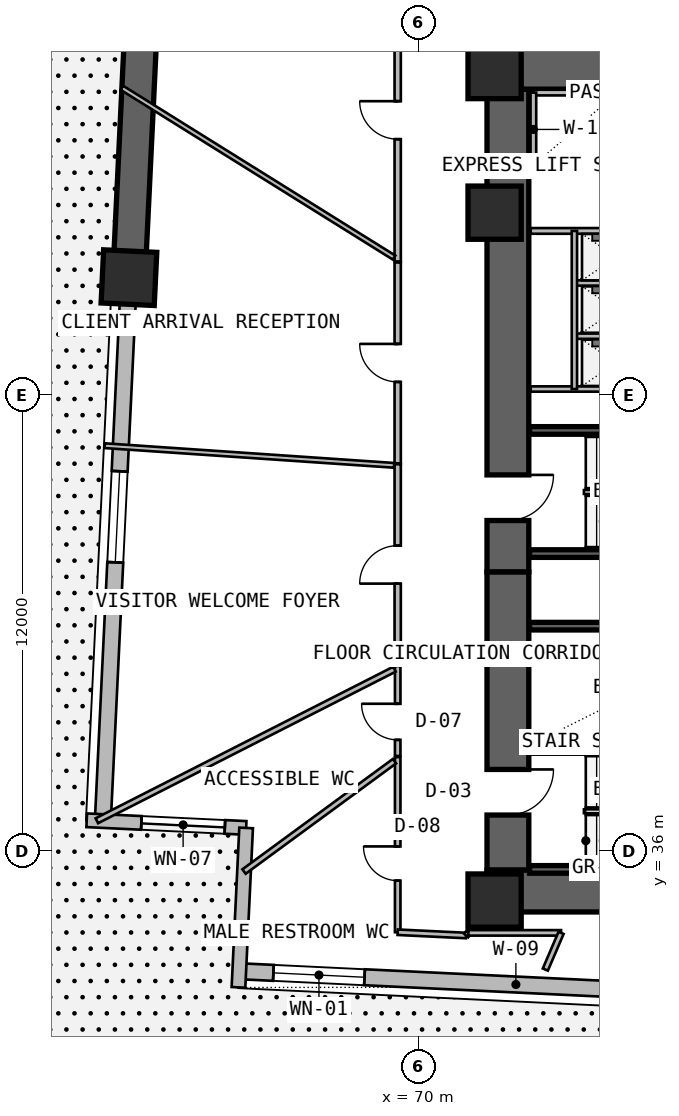
"""IFC4 building model, lengths in metres.
Left out: names, types, materials, properties, quantities, classifications, styles, units other than length and angle.
Written with IfcOpenShell. Run it as: python <this file> out.ifc"""

import sys

from ifc_helpers import new_model, si_unit, direction, frame, frame_2d, origin, origin_2d, place, context, subcontext, project, spatial, rectangle, extrude, element, fill, save


model = new_model("IFC4")
c1 = context("Model", 3, precision=1e-05, world=origin(), true_north=direction((0.0, 1.0)))
c2 = subcontext(c1, "Body", "Model", "MODEL_VIEW")
j1 = project(units=[si_unit("LENGTHUNIT", "METRE"), si_unit("PLANEANGLEUNIT", "RADIAN")], contexts=[c1])
p1 = place(None, origin())
s1 = spatial("IfcSite", under=j1, at=p1, CompositionType="ELEMENT")
p2 = place(p1, origin())
s2 = spatial("IfcBuilding", under=s1, at=p2, CompositionType="ELEMENT")
p3 = place(p2, frame((0.0, 0.0, 26.7)))
s3 = spatial("IfcBuildingStorey", under=s2, at=p3, CompositionType="ELEMENT", Elevation=26.7)
p4 = place(p3, frame((72.35, 35.5, -0.4), z_axis=(0.0, 0.0, 1.0), x_axis=(0.0, 1.0, 0.0)))
e1 = element("IfcWall", 1, at=p4, inside=s3, PredefinedType="SHEAR", context=c2, shape_type="SweptSolid", body=[
    extrude(rectangle(XDim=7.85, YDim=1.1, at=frame_2d((3.925, 0.0))), origin(), (0.0, 0.0, 1.0), 3.8),
])
p5 = place(p4, frame((1.45, 0.0, 0.4)))
e2 = element("IfcOpeningElement", 2, at=p5, cuts=e1, PredefinedType="OPENING", context=c2, shape_type="SweptSolid", body=[
    extrude(rectangle(XDim=1.2, YDim=2.2, at=frame_2d((0.6, 1.1))), frame((0.0, 0.56, 0.0), z_axis=(0.0, -1.0, 0.0), x_axis=(1.0, 0.0, 0.0)), (0.0, 0.0, 1.0), 1.12),
])
p6 = place(p3, frame((71.8, 34.95, -0.4), z_axis=(0.0, 0.0, 1.0), x_axis=(1.0, 0.0, 0.0)))
e3 = element("IfcWall", 3, at=p6, inside=s3, PredefinedType="SHEAR", context=c2, shape_type="SweptSolid", body=[
    extrude(rectangle(XDim=14.3, YDim=1.1, at=frame_2d((7.15, 0.0))), origin(), (0.0, 0.0, 1.0), 3.8),
])
p7 = place(p3, frame((72.35, 43.35, -0.4), z_axis=(0.0, 0.0, 1.0), x_axis=(0.0, 1.0, 0.0)))
e4 = element("IfcWall", 4, at=p7, inside=s3, PredefinedType="SHEAR", context=c2, shape_type="SweptSolid", body=[
    extrude(rectangle(XDim=12.7, YDim=1.1, at=frame_2d((6.35, 0.0))), origin(), (0.0, 0.0, 1.0), 3.8),
])
p8 = place(p7, frame((1.35, 0.0, 0.4)))
e5 = element("IfcOpeningElement", 5, at=p8, cuts=e4, PredefinedType="OPENING", context=c2, shape_type="SweptSolid", body=[
    extrude(rectangle(XDim=1.2, YDim=2.2, at=frame_2d((0.6, 1.1))), frame((0.0, 0.56, 0.0), z_axis=(0.0, -1.0, 0.0), x_axis=(1.0, 0.0, 0.0)), (0.0, 0.0, 1.0), 1.12),
])
p9 = place(p3, frame((71.8, 56.6, -0.4), z_axis=(0.0, 0.0, 1.0), x_axis=(1.0, 0.0, 0.0)))
e6 = element("IfcWall", 6, at=p9, inside=s3, PredefinedType="SHEAR", context=c2, shape_type="SweptSolid", body=[
    extrude(rectangle(XDim=14.3, YDim=1.1, at=frame_2d((7.15, 0.0))), origin(), (0.0, 0.0, 1.0), 3.8),
])
for number, where, z_axis, x_axis in (
    (7, (72.0, 34.7, 0.0), (0.0, 0.0, 1.0), (1.0, 0.0, 0.0)),
    (8, (72.0, 52.8, 0.0), (0.0, 0.0, 1.0), (1.0, 0.0, 0.0)),
    (9, (72.0, 56.5, 0.0), (0.0, 0.0, 1.0), (1.0, 0.0, 0.0)),
):
    element("IfcColumn", number, at=place(p3, frame(where, z_axis=z_axis, x_axis=x_axis)), inside=s3, PredefinedType="COLUMN", context=c2, shape_type="SweptSolid", body=[
        extrude(rectangle(XDim=1.4, YDim=1.4, at=origin_2d()), origin(), (0.0, 0.0, 1.0), 3.6),
    ])
p10 = place(p3, frame((62.378, 51.09, -0.4), z_axis=(0.0, 0.0, 1.0), x_axis=(0.047978128521, 0.998848386485, 0.0)))
e10 = element("IfcColumn", 10, at=p10, inside=s3, PredefinedType="COLUMN", context=c2, shape_type="SweptSolid", body=[
    extrude(rectangle(XDim=1.4, YDim=1.4, at=origin_2d()), origin(), (0.0, 0.0, 1.0), 4.0),
])
p11 = place(p3, frame((65.281, 32.841, 0.0), z_axis=(0.0, 0.0, 1.0), x_axis=(0.998848298084, -0.047979968897, 0.0)))
e11 = element("IfcWall", 11, at=p11, inside=s3, PredefinedType="SOLIDWALL", context=c2, shape_type="SweptSolid", body=[
    extrude(rectangle(XDim=17.952, YDim=0.42, at=frame_2d((8.976, 0.0))), origin(), (0.0, 0.0, 1.0), 2.385),
])
p12 = place(p11, frame((11.276, 0.0, 0.0)))
e12 = element("IfcOpeningElement", 12, at=p12, cuts=e11, PredefinedType="OPENING", context=c2, shape_type="SweptSolid", body=[
    extrude(rectangle(XDim=1.8, YDim=2.35, at=frame_2d((0.9, 1.175))), frame((0.0, 0.22, 0.0), z_axis=(0.0, -1.0, 0.0), x_axis=(1.0, 0.0, 0.0)), (0.0, 0.0, 1.0), 0.44),
])
p13 = place(p11, frame((0.9, 0.0, 1.2)))
e13 = element("IfcOpeningElement", 13, at=p13, cuts=e11, PredefinedType="OPENING", context=c2, shape_type="SweptSolid", body=[
    extrude(rectangle(XDim=2.4, YDim=0.9, at=frame_2d((1.2, 0.45))), frame((0.0, 0.22, 0.0), z_axis=(0.0, -1.0, 0.0), x_axis=(1.0, 0.0, 0.0)), (0.0, 0.0, 1.0), 0.44),
])
p14 = place(p3, frame((63.428, 72.957, -0.4), z_axis=(0.0, 0.0, 1.0), x_axis=(-0.047976309476, -0.998848473858, 0.0)))
e14 = element("IfcWall", 14, at=p14, inside=s3, PredefinedType="SHEAR", context=c2, shape_type="SweptSolid", body=[
    extrude(rectangle(XDim=21.892, YDim=0.85, at=frame_2d((10.946, 0.0))), origin(), (0.0, 0.0, 1.0), 3.8),
])
p15 = place(p3, frame((62.378, 51.09, 0.0), z_axis=(0.0, 0.0, 1.0), x_axis=(-0.047978424452, -0.99884837227, 0.0)))
e15 = element("IfcWall", 15, at=p15, inside=s3, PredefinedType="SOLIDWALL", context=c2, shape_type="SweptSolid", body=[
    extrude(rectangle(XDim=14.314, YDim=0.42, at=frame_2d((7.157, 0.0))), origin(), (0.0, 0.0, 1.0), 2.385),
])
p16 = place(p15, frame((5.1, 0.0, 1.2)))
e16 = element("IfcOpeningElement", 16, at=p16, cuts=e15, PredefinedType="OPENING", context=c2, shape_type="SweptSolid", body=[
    extrude(rectangle(XDim=2.4, YDim=0.9, at=frame_2d((1.2, 0.45))), frame((0.0, 0.22, 0.0), z_axis=(0.0, -1.0, 0.0), x_axis=(1.0, 0.0, 0.0)), (0.0, 0.0, 1.0), 0.44),
])
p17 = place(p3, frame((61.267, 36.812, 0.0), z_axis=(0.0, 0.0, 1.0), x_axis=(0.998849519138, -0.047954542207, 0.0)))
e17 = element("IfcWall", 17, at=p17, inside=s3, PredefinedType="SOLIDWALL", context=c2, shape_type="SweptSolid", body=[
    extrude(rectangle(XDim=4.2, YDim=0.36, at=frame_2d((2.1, 0.0))), origin(), (0.0, 0.0, 1.0), 3.4),
])
p18 = place(p17, frame((1.44, 0.0, 0.45)))
e18 = element("IfcOpeningElement", 18, at=p18, cuts=e17, PredefinedType="OPENING", context=c2, shape_type="SweptSolid", body=[
    extrude(rectangle(XDim=2.2, YDim=2.4, at=frame_2d((1.1, 1.2))), frame((0.0, 0.19, 0.0), z_axis=(0.0, -1.0, 0.0), x_axis=(1.0, 0.0, 0.0)), (0.0, 0.0, 1.0), 0.38),
])
p19 = place(p3, frame((65.462, 36.611, 0.0), z_axis=(0.0, 0.0, 1.0), x_axis=(-0.048015322758, -0.998846599224, 0.0)))
e19 = element("IfcWall", 19, at=p19, inside=s3, PredefinedType="SOLIDWALL", context=c2, shape_type="SweptSolid", body=[
    extrude(rectangle(XDim=4.2, YDim=0.36, at=frame_2d((2.1, 0.0))), origin(), (0.0, 0.0, 1.0), 3.4),
])
for number, where, z_axis, x_axis in (
    (20, (72.92, 35.52, -0.4), (0.0, 0.0, 1.0), (1.0, 0.0, 0.0)),
    (21, (72.92, 38.675, -0.4), (0.0, 0.0, 1.0), (1.0, 0.0, 0.0)),
):
    element("IfcWall", number, at=place(p3, frame(where, z_axis=z_axis, x_axis=x_axis)), inside=s3, PredefinedType="SOLIDWALL", context=c2, shape_type="SweptSolid", body=[
        extrude(rectangle(XDim=7.7, YDim=0.2, at=frame_2d((3.85, 0.0))), origin(), (0.0, 0.0, 1.0), 3.8),
    ])
p20 = place(p3, frame((72.92, 41.92, -0.4), z_axis=(0.0, 0.0, 1.0), x_axis=(1.0, 0.0, 0.0)))
e22 = element("IfcWall", 22, at=p20, inside=s3, PredefinedType="SOLIDWALL", context=c2, shape_type="SweptSolid", body=[
    extrude(rectangle(XDim=7.58, YDim=0.2, at=frame_2d((3.79, 0.0))), origin(), (0.0, 0.0, 1.0), 3.8),
])
for number, where, z_axis, x_axis in (
    (23, (72.92, 43.83, -0.4), (0.0, 0.0, 1.0), (1.0, 0.0, 0.0)),
    (24, (72.92, 47.07, -0.4), (0.0, 0.0, 1.0), (1.0, 0.0, 0.0)),
):
    element("IfcWall", number, at=place(p3, frame(where, z_axis=z_axis, x_axis=x_axis)), inside=s3, PredefinedType="SOLIDWALL", context=c2, shape_type="SweptSolid", body=[
        extrude(rectangle(XDim=7.7, YDim=0.2, at=frame_2d((3.85, 0.0))), origin(), (0.0, 0.0, 1.0), 3.8),
    ])
p21 = place(p3, frame((72.95, 52.32, 0.0), z_axis=(0.0, 0.0, 1.0), x_axis=(1.0, 0.0, 0.0)))
e25 = element("IfcWall", 25, at=p21, inside=s3, PredefinedType="SOLIDWALL", context=c2, shape_type="SweptSolid", body=[
    extrude(rectangle(XDim=3.33, YDim=0.15, at=frame_2d((1.665, 0.0))), origin(), (0.0, 0.0, 1.0), 3.4),
])
p22 = place(p3, frame((72.95, 48.16, 0.0), z_axis=(0.0, 0.0, 1.0), x_axis=(1.0, 0.0, 0.0)))
e26 = element("IfcWall", 26, at=p22, inside=s3, PredefinedType="PLUMBINGWALL", context=c2, shape_type="SweptSolid", body=[
    extrude(rectangle(XDim=3.24, YDim=0.14, at=frame_2d((1.62, 0.0))), origin(), (0.0, 0.0, 1.0), 3.4),
])
for number, where, z_axis, x_axis in (
    (27, (74.15, 49.55, 0.0), (0.0, 0.0, 1.0), (1.0, 0.0, 0.0)),
    (28, (74.15, 50.95, 0.0), (0.0, 0.0, 1.0), (1.0, 0.0, 0.0)),
):
    element("IfcWall", number, at=place(p3, frame(where, z_axis=z_axis, x_axis=x_axis)), inside=s3, PredefinedType="PLUMBINGWALL", context=c2, shape_type="SweptSolid", body=[
        extrude(rectangle(XDim=2.04, YDim=0.14, at=frame_2d((1.02, 0.0))), origin(), (0.0, 0.0, 1.0), 3.4),
    ])
p23 = place(p3, frame((74.1, 48.16, 0.0), z_axis=(0.0, 0.0, 1.0), x_axis=(0.0, 1.0, 0.0)))
e29 = element("IfcWall", 29, at=p23, inside=s3, PredefinedType="PLUMBINGWALL", context=c2, shape_type="SweptSolid", body=[
    extrude(rectangle(XDim=4.16, YDim=0.14, at=frame_2d((2.08, 0.0))), origin(), (0.0, 0.0, 1.0), 3.4),
])
p24 = place(p3, frame((73.02, 54.02, 0.0), z_axis=(0.0, 0.0, 1.0), x_axis=(1.0, 0.0, 0.0)))
e30 = element("IfcWall", 30, at=p24, inside=s3, PredefinedType="SOLIDWALL", context=c2, shape_type="SweptSolid", body=[
    extrude(rectangle(XDim=12.08, YDim=0.16, at=frame_2d((6.04, 0.0))), origin(), (0.0, 0.0, 1.0), 3.4),
])
p25 = place(p3, frame((73.02, 55.96, 0.0), z_axis=(0.0, 0.0, 1.0), x_axis=(1.0, 0.0, 0.0)))
e31 = element("IfcWall", 31, at=p25, inside=s3, PredefinedType="SOLIDWALL", context=c2, shape_type="SweptSolid", body=[
    extrude(rectangle(XDim=3.5, YDim=0.15, at=frame_2d((1.75, 0.0))), origin(), (0.0, 0.0, 1.0), 3.4),
])
p26 = place(p3, frame((73.02, 54.02, 0.0), z_axis=(0.0, 0.0, 1.0), x_axis=(0.0, 1.0, 0.0)))
e32 = element("IfcWall", 32, at=p26, inside=s3, PredefinedType="PLUMBINGWALL", context=c2, shape_type="SweptSolid", body=[
    extrude(rectangle(XDim=1.94, YDim=0.15, at=frame_2d((0.97, 0.0))), origin(), (0.0, 0.0, 1.0), 3.4),
])
p27 = place(p3, frame((69.45, 38.474, 0.0), z_axis=(0.0, 0.0, 1.0), x_axis=(0.0, -1.0, 0.0)))
e33 = element("IfcWall", 33, at=p27, inside=s3, PredefinedType="PARTITIONING", context=c2, shape_type="SweptSolid", body=[
    extrude(rectangle(XDim=4.608, YDim=0.145, at=frame_2d((2.304, 0.0))), origin(), (0.0, 0.0, 1.0), 3.4),
])
p28 = place(p27, frame((2.35, 0.0, 0.0)))
e34 = element("IfcOpeningElement", 34, at=p28, cuts=e33, PredefinedType="OPENING", context=c2, shape_type="SweptSolid", body=[
    extrude(rectangle(XDim=0.9, YDim=2.1, at=frame_2d((0.45, 1.05))), frame((0.0, 0.083, 0.0), z_axis=(0.0, -1.0, 0.0), x_axis=(1.0, 0.0, 0.0)), (0.0, 0.0, 1.0), 0.165),
])
p29 = place(p3, frame((69.45, 33.867, 0.0), z_axis=(0.0, 0.0, 1.0), x_axis=(0.998849363928, -0.047957774967, 0.0)))
e35 = element("IfcWall", 35, at=p29, inside=s3, PredefinedType="PARTITIONING", context=c2, shape_type="SweptSolid", body=[
    extrude(rectangle(XDim=1.802, YDim=0.145, at=frame_2d((0.901, 0.0))), origin(), (0.0, 0.0, 1.0), 3.4),
])
p30 = place(p3, frame((71.25, 33.78, 0.0), z_axis=(0.0, 0.0, 1.0), x_axis=(0.652100218984, 0.758132774916, 0.0)))
e36 = element("IfcWall", 36, at=p30, inside=s3, PredefinedType="PARTITIONING", context=c2, shape_type="SweptSolid", body=[
    extrude(rectangle(XDim=0.092, YDim=0.145, at=frame_2d((0.046, 0.0))), origin(), (0.0, 0.0, 1.0), 3.4),
])
p31 = place(p3, frame((65.407, 35.464, 0.0), z_axis=(0.0, 0.0, 1.0), x_axis=(0.806404995856, 0.591363663628, 0.0)))
e37 = element("IfcWall", 37, at=p31, inside=s3, PredefinedType="PARTITIONING", context=c2, shape_type="SweptSolid", body=[
    extrude(rectangle(XDim=4.909, YDim=0.145, at=frame_2d((2.455, 0.0))), origin(), (0.0, 0.0, 1.0), 3.4),
])
p32 = place(p3, frame((69.45, 40.871, 0.0), z_axis=(0.0, 0.0, 1.0), x_axis=(0.0, -1.0, 0.0)))
e38 = element("IfcWall", 38, at=p32, inside=s3, PredefinedType="PARTITIONING", context=c2, shape_type="SweptSolid", body=[
    extrude(rectangle(XDim=2.366, YDim=0.145, at=frame_2d((1.183, 0.0))), origin(), (0.0, 0.0, 1.0), 3.4),
])
p33 = place(p32, frame((0.993, 0.0, 0.0)))
e39 = element("IfcOpeningElement", 39, at=p33, cuts=e38, PredefinedType="OPENING", context=c2, shape_type="SweptSolid", body=[
    extrude(rectangle(XDim=0.95, YDim=2.15, at=frame_2d((0.475, 1.075))), frame((0.0, 0.083, 0.0), z_axis=(0.0, -1.0, 0.0), x_axis=(1.0, 0.0, 0.0)), (0.0, 0.0, 1.0), 0.165),
])
p34 = place(p3, frame((61.533, 36.8, 0.0), z_axis=(0.0, 0.0, 1.0), x_axis=(0.891148005013, 0.453712720961, 0.0)))
e40 = element("IfcWall", 40, at=p34, inside=s3, PredefinedType="PARTITIONING", context=c2, shape_type="SweptSolid", body=[
    extrude(rectangle(XDim=8.789, YDim=0.145, at=frame_2d((4.395, 0.0))), origin(), (0.0, 0.0, 1.0), 3.4),
])
p35 = place(p3, frame((69.45, 58.95, 0.0), z_axis=(0.0, 0.0, 1.0), x_axis=(0.0, -1.0, 0.0)))
e41 = element("IfcWall", 41, at=p35, inside=s3, PredefinedType="PARTITIONING", context=c2, shape_type="SweptSolid", body=[
    extrude(rectangle(XDim=7.433, YDim=0.165, at=frame_2d((3.717, 0.0))), origin(), (0.0, 0.0, 1.0), 2.785),
])
p36 = place(p35, frame((3.217, 0.0, 0.0)))
e42 = element("IfcOpeningElement", 42, at=p36, cuts=e41, PredefinedType="OPENING", context=c2, shape_type="SweptSolid", body=[
    extrude(rectangle(XDim=1.0, YDim=2.2, at=frame_2d((0.5, 1.1))), frame((0.0, 0.093, 0.0), z_axis=(0.0, -1.0, 0.0), x_axis=(1.0, 0.0, 0.0)), (0.0, 0.0, 1.0), 0.185),
])
p37 = place(p3, frame((69.355, 51.618, 0.0), z_axis=(0.0, 0.0, 1.0), x_axis=(-0.848537287103, 0.529135589803, 0.0)))
e43 = element("IfcWall", 43, at=p37, inside=s3, PredefinedType="PARTITIONING", context=c2, shape_type="SweptSolid", body=[
    extrude(rectangle(XDim=8.442, YDim=0.125, at=frame_2d((4.221, 0.0))), origin(), (0.0, 0.0, 1.0), 2.385),
])
p38 = place(p3, frame((69.45, 46.181, 0.0), z_axis=(0.0, 0.0, 1.0), x_axis=(0.0, -1.0, 0.0)))
e44 = element("IfcWall", 44, at=p38, inside=s3, PredefinedType="PARTITIONING", context=c2, shape_type="SweptSolid", body=[
    extrude(rectangle(XDim=5.283, YDim=0.165, at=frame_2d((2.642, 0.0))), origin(), (0.0, 0.0, 1.0), 3.4),
])
p39 = place(p38, frame((2.142, 0.0, 0.0)))
e45 = element("IfcOpeningElement", 45, at=p39, cuts=e44, PredefinedType="OPENING", context=c2, shape_type="SweptSolid", body=[
    extrude(rectangle(XDim=1.0, YDim=2.2, at=frame_2d((0.5, 1.1))), frame((0.0, 0.093, 0.0), z_axis=(0.0, -1.0, 0.0), x_axis=(1.0, 0.0, 0.0)), (0.0, 0.0, 1.0), 0.185),
])
p40 = place(p3, frame((61.74, 46.669, 0.0), z_axis=(0.0, 0.0, 1.0), x_axis=(0.997700583313, -0.067775704037, 0.0)))
e46 = element("IfcWall", 46, at=p40, inside=s3, PredefinedType="PARTITIONING", context=c2, shape_type="SweptSolid", body=[
    extrude(rectangle(XDim=7.633, YDim=0.125, at=frame_2d((3.816, 0.0))), origin(), (0.0, 0.0, 1.0), 3.4),
])
p41 = place(p3, frame((69.45, 51.489, 0.0), z_axis=(0.0, 0.0, 1.0), x_axis=(0.0, -1.0, 0.0)))
e47 = element("IfcWall", 47, at=p41, inside=s3, PredefinedType="PARTITIONING", context=c2, shape_type="SweptSolid", body=[
    extrude(rectangle(XDim=5.283, YDim=0.165, at=frame_2d((2.642, 0.0))), origin(), (0.0, 0.0, 1.0), 3.4),
])
p42 = place(p41, frame((2.142, 0.0, 0.0)))
e48 = element("IfcOpeningElement", 48, at=p42, cuts=e47, PredefinedType="OPENING", context=c2, shape_type="SweptSolid", body=[
    extrude(rectangle(XDim=1.0, YDim=2.2, at=frame_2d((0.5, 1.1))), frame((0.0, 0.093, 0.0), z_axis=(0.0, -1.0, 0.0), x_axis=(1.0, 0.0, 0.0)), (0.0, 0.0, 1.0), 0.185),
])
p43 = place(p3, frame((71.31, 33.85, 0.0), z_axis=(0.0, 0.0, 1.0), x_axis=(1.0, 0.0, 0.0)))
e49 = element("IfcWall", 49, at=p43, inside=s3, PredefinedType="PARTITIONING", context=c2, shape_type="SweptSolid", body=[
    extrude(rectangle(XDim=2.439, YDim=0.145, at=frame_2d((1.22, 0.0))), origin(), (0.0, 0.0, 1.0), 3.4),
])
p44 = place(p3, frame((73.749, 33.85, 0.0), z_axis=(0.0, 0.0, 1.0), x_axis=(-0.394143536932, -0.919048895486, 0.0)))
e50 = element("IfcWall", 50, at=p44, inside=s3, PredefinedType="PARTITIONING", context=c2, shape_type="SweptSolid", body=[
    extrude(rectangle(XDim=1.051, YDim=0.145, at=frame_2d((0.526, 0.0))), origin(), (0.0, 0.0, 1.0), 3.4),
])
p45 = place(p13, origin())
e51 = element("IfcWindow", 51, at=p45, inside=s3, PartitioningType="SINGLE_PANEL", PredefinedType="WINDOW", context=c2, shape_type="SweptSolid", body=[
    extrude(rectangle(XDim=2.4, YDim=0.9, at=frame_2d((1.2, 0.45))), frame((0.0, 0.03, 0.0), z_axis=(0.0, -1.0, 0.0), x_axis=(1.0, 0.0, 0.0)), (0.0, 0.0, 1.0), 0.06),
])
fill(e13, e51)
p46 = place(p16, origin())
e52 = element("IfcWindow", 52, at=p46, inside=s3, PartitioningType="SINGLE_PANEL", PredefinedType="WINDOW", context=c2, shape_type="SweptSolid", body=[
    extrude(rectangle(XDim=2.4, YDim=0.9, at=frame_2d((1.2, 0.45))), frame((0.0, 0.03, 0.0), z_axis=(0.0, -1.0, 0.0), x_axis=(1.0, 0.0, 0.0)), (0.0, 0.0, 1.0), 0.06),
])
fill(e16, e52)
p47 = place(p18, origin())
e53 = element("IfcWindow", 53, at=p47, inside=s3, PartitioningType="SINGLE_PANEL", PredefinedType="WINDOW", context=c2, shape_type="SweptSolid", body=[
    extrude(rectangle(XDim=2.2, YDim=2.4, at=frame_2d((1.1, 1.2))), frame((0.0, 0.03, 0.0), z_axis=(0.0, -1.0, 0.0), x_axis=(1.0, 0.0, 0.0)), (0.0, 0.0, 1.0), 0.06),
])
fill(e18, e53)
p48 = place(p5, frame((1.2, 0.0, 0.0), z_axis=(0.0, 0.0, 1.0), x_axis=(-1.0, 0.0, 0.0)))
e54 = element("IfcDoor", 54, at=p48, inside=s3, OperationType="SINGLE_SWING_LEFT", PredefinedType="USERDEFINED", context=c2, shape_type="SweptSolid", body=[
    extrude(rectangle(XDim=1.2, YDim=2.2, at=frame_2d((0.6, 1.1))), frame((0.0, 0.025, 0.0), z_axis=(0.0, -1.0, 0.0), x_axis=(1.0, 0.0, 0.0)), (0.0, 0.0, 1.0), 0.05),
])
fill(e2, e54)
p49 = place(p8, frame((1.2, 0.0, 0.0), z_axis=(0.0, 0.0, 1.0), x_axis=(-1.0, 0.0, 0.0)))
e55 = element("IfcDoor", 55, at=p49, inside=s3, OperationType="SINGLE_SWING_LEFT", PredefinedType="USERDEFINED", context=c2, shape_type="SweptSolid", body=[
    extrude(rectangle(XDim=1.2, YDim=2.2, at=frame_2d((0.6, 1.1))), frame((0.0, 0.025, 0.0), z_axis=(0.0, -1.0, 0.0), x_axis=(1.0, 0.0, 0.0)), (0.0, 0.0, 1.0), 0.05),
])
fill(e5, e55)
p50 = place(p28, frame((0.9, 0.0, 0.0), z_axis=(0.0, 0.0, 1.0), x_axis=(-1.0, 0.0, 0.0)))
e56 = element("IfcDoor", 56, at=p50, inside=s3, OperationType="SINGLE_SWING_RIGHT", PredefinedType="DOOR", context=c2, shape_type="SweptSolid", body=[
    extrude(rectangle(XDim=0.9, YDim=2.1, at=frame_2d((0.45, 1.05))), frame((0.0, 0.025, 0.0), z_axis=(0.0, -1.0, 0.0), x_axis=(1.0, 0.0, 0.0)), (0.0, 0.0, 1.0), 0.05),
])
fill(e34, e56)
p51 = place(p33, frame((0.95, 0.0, 0.0), z_axis=(0.0, 0.0, 1.0), x_axis=(-1.0, 0.0, 0.0)))
e57 = element("IfcDoor", 57, at=p51, inside=s3, OperationType="SINGLE_SWING_RIGHT", PredefinedType="DOOR", context=c2, shape_type="SweptSolid", body=[
    extrude(rectangle(XDim=0.95, YDim=2.15, at=frame_2d((0.475, 1.075))), frame((0.0, 0.025, 0.0), z_axis=(0.0, -1.0, 0.0), x_axis=(1.0, 0.0, 0.0)), (0.0, 0.0, 1.0), 0.05),
])
fill(e39, e57)
p52 = place(p36, frame((1.0, 0.0, 0.0), z_axis=(0.0, 0.0, 1.0), x_axis=(-1.0, 0.0, 0.0)))
e58 = element("IfcDoor", 58, at=p52, inside=s3, OperationType="SINGLE_SWING_RIGHT", PredefinedType="DOOR", context=c2, shape_type="SweptSolid", body=[
    extrude(rectangle(XDim=1.0, YDim=2.2, at=frame_2d((0.5, 1.1))), frame((0.0, 0.025, 0.0), z_axis=(0.0, -1.0, 0.0), x_axis=(1.0, 0.0, 0.0)), (0.0, 0.0, 1.0), 0.05),
])
fill(e42, e58)
p53 = place(p39, frame((1.0, 0.0, 0.0), z_axis=(0.0, 0.0, 1.0), x_axis=(-1.0, 0.0, 0.0)))
e59 = element("IfcDoor", 59, at=p53, inside=s3, OperationType="SINGLE_SWING_LEFT", PredefinedType="DOOR", context=c2, shape_type="SweptSolid", body=[
    extrude(rectangle(XDim=1.0, YDim=2.2, at=frame_2d((0.5, 1.1))), frame((0.0, 0.025, 0.0), z_axis=(0.0, -1.0, 0.0), x_axis=(1.0, 0.0, 0.0)), (0.0, 0.0, 1.0), 0.05),
])
fill(e45, e59)
p54 = place(p42, frame((1.0, 0.0, 0.0), z_axis=(0.0, 0.0, 1.0), x_axis=(-1.0, 0.0, 0.0)))
e60 = element("IfcDoor", 60, at=p54, inside=s3, OperationType="SINGLE_SWING_RIGHT", PredefinedType="DOOR", context=c2, shape_type="SweptSolid", body=[
    extrude(rectangle(XDim=1.0, YDim=2.2, at=frame_2d((0.5, 1.1))), frame((0.0, 0.025, 0.0), z_axis=(0.0, -1.0, 0.0), x_axis=(1.0, 0.0, 0.0)), (0.0, 0.0, 1.0), 0.05),
])
fill(e48, e60)
save(model, sys.argv[1])
